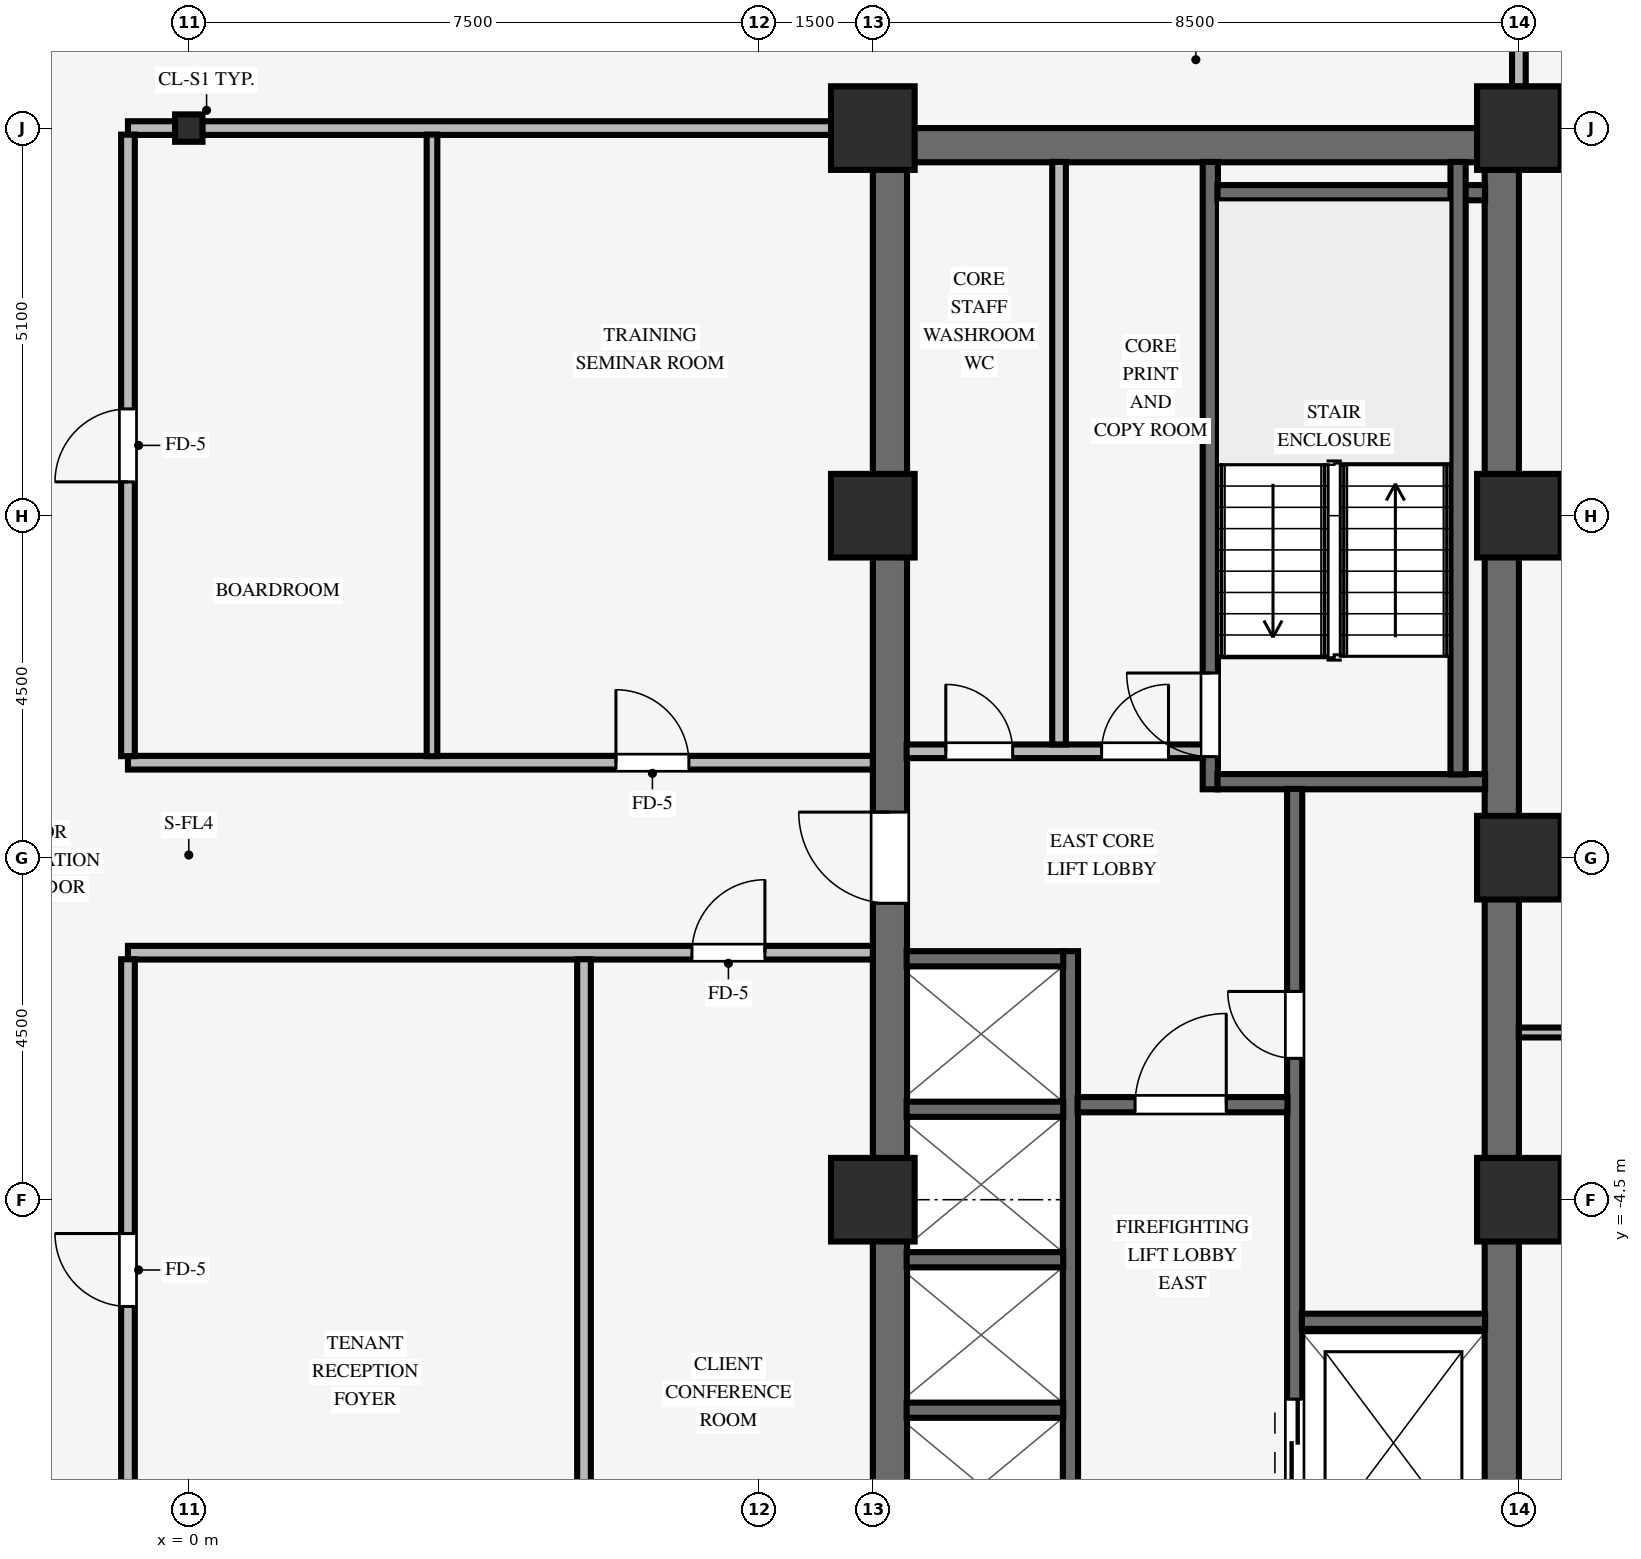
"""IFC4 building model, lengths in metres.
Left out: names, types, materials, properties, quantities, classifications, styles, units other than length and angle.
Written with IfcOpenShell. Run it as: python <this file> out.ifc"""

import sys

from ifc_helpers import new_model, si_unit, direction, frame, frame_2d, origin, origin_2d, place, context, subcontext, project, spatial, rectangle, i_section, extrude, source, transform, mapped, element, fill, save


model = new_model("IFC4")
c1 = context("Model", 3, precision=1e-05, world=origin(), true_north=direction((0.0, 1.0)))
c2 = subcontext(c1, "Body", "Model", "MODEL_VIEW")
j1 = project(units=[si_unit("LENGTHUNIT", "METRE"), si_unit("PLANEANGLEUNIT", "RADIAN")], contexts=[c1])
p1 = place(None, origin())
s1 = spatial("IfcSite", under=j1, at=p1, CompositionType="ELEMENT")
p2 = place(p1, origin())
s2 = spatial("IfcBuilding", under=s1, at=p2, CompositionType="ELEMENT")
p3 = place(p2, frame((0.0, 0.0, 82.35)))
s3 = spatial("IfcBuildingStorey", under=s2, at=p3, CompositionType="ELEMENT", Elevation=82.35)
p4 = place(p3, frame((9.0, 9.375, 0.0), z_axis=(0.0, 0.0, 1.0), x_axis=(1.0, 0.0, 0.0)))
e1 = element("IfcWall", 1, at=p4, inside=s3, PredefinedType="SHEAR", context=c2, shape_type="SweptSolid", body=[
    extrude(rectangle(XDim=8.5, YDim=0.45, at=frame_2d((4.25, 0.0))), origin(), (0.0, 0.0, 1.0), 3.25),
])
p5 = place(p3, frame((9.225, -9.155, 0.0), z_axis=(0.0, 0.0, 1.0), x_axis=(0.0, 1.0, 0.0)))
e2 = element("IfcWall", 2, at=p5, inside=s3, PredefinedType="SHEAR", context=c2, shape_type="SweptSolid", body=[
    extrude(rectangle(XDim=18.31, YDim=0.45, at=frame_2d((9.155, 0.0))), origin(), (0.0, 0.0, 1.0), 3.25),
])
p6 = place(p5, frame((8.555, 0.0, 0.0)))
e3 = element("IfcOpeningElement", 3, at=p6, cuts=e2, PredefinedType="OPENING", context=c2, shape_type="SweptSolid", body=[
    extrude(rectangle(XDim=1.2, YDim=2.15, at=frame_2d((0.6, 1.075))), frame((0.0, 0.235, 0.0), z_axis=(0.0, -1.0, 0.0), x_axis=(1.0, 0.0, 0.0)), (0.0, 0.0, 1.0), 0.47),
])
p7 = place(p3, frame((17.275, -9.155, 0.0), z_axis=(0.0, 0.0, 1.0), x_axis=(0.0, 1.0, 0.0)))
e4 = element("IfcWall", 4, at=p7, inside=s3, PredefinedType="SHEAR", context=c2, shape_type="SweptSolid", body=[
    extrude(rectangle(XDim=18.31, YDim=0.45, at=frame_2d((9.155, 0.0))), origin(), (0.0, 0.0, 1.0), 3.25),
])
for number, where, z_axis, x_axis in (
    (5, (9.0, -4.5, 0.0), (0.0, 0.0, 1.0), (1.0, 0.0, 0.0)),
    (6, (9.0, 4.5, 0.0), (0.0, 0.0, 1.0), (1.0, 0.0, 0.0)),
    (7, (9.0, 9.6, 0.0), (0.0, 0.0, 1.0), (1.0, 0.0, 0.0)),
    (8, (17.5, -4.5, 0.0), (0.0, 0.0, 1.0), (1.0, 0.0, 0.0)),
    (9, (17.5, 4.5, 0.0), (0.0, 0.0, 1.0), (1.0, 0.0, 0.0)),
    (10, (17.5, 9.6, 0.0), (0.0, 0.0, 1.0), (1.0, 0.0, 0.0)),
    (11, (17.5, 0.0, 0.0), (0.0, 0.0, 1.0), (1.0, 0.0, 0.0)),
):
    element("IfcColumn", number, at=place(p3, frame(where, z_axis=z_axis, x_axis=x_axis)), inside=s3, PredefinedType="COLUMN", context=c2, shape_type="SweptSolid", body=[
        extrude(rectangle(XDim=1.1, YDim=1.1, at=origin_2d()), origin(), (0.0, 0.0, 1.0), 3.25),
    ])
p8 = place(p3, frame((0.0, 9.6, 0.0), z_axis=(0.0, 0.0, 1.0), x_axis=(1.0, 0.0, 0.0)))
e12 = element("IfcColumn", 12, at=p8, inside=s3, PredefinedType="COLUMN", context=c2, shape_type="SweptSolid", body=[
    extrude(i_section(OverallWidth=0.36, OverallDepth=0.36, WebThickness=0.021, FlangeThickness=0.021, FilletRadius=0.018, at=origin_2d()), origin(), (0.0, 0.0, 1.0), 3.25),
])
p9 = place(p3, frame((13.44, 0.9, 0.0), z_axis=(0.0, 0.0, 1.0), x_axis=(0.0, 1.0, 0.0)))
e13 = element("IfcWall", 13, at=p9, inside=s3, PredefinedType="SHEAR", context=c2, shape_type="SweptSolid", body=[
    extrude(rectangle(XDim=8.255, YDim=0.2, at=frame_2d((4.127, 0.0))), origin(), (0.0, 0.0, 1.0), 3.25),
])
p10 = place(p9, frame((0.43, 0.0, 0.0)))
e14 = element("IfcOpeningElement", 14, at=p10, cuts=e13, PredefinedType="OPENING", context=c2, shape_type="SweptSolid", body=[
    extrude(rectangle(XDim=1.1, YDim=2.15, at=frame_2d((0.55, 1.075))), frame((0.0, 0.11, 0.0), z_axis=(0.0, -1.0, 0.0), x_axis=(1.0, 0.0, 0.0)), (0.0, 0.0, 1.0), 0.22),
])
for number, where, z_axis, x_axis in (
    (15, (13.535, 1.0, 0.0), (0.0, 0.0, 1.0), (1.0, 0.0, 0.0)),
    (16, (13.535, 8.75, 0.0), (0.0, 0.0, 1.0), (1.0, 0.0, 0.0)),
):
    element("IfcWall", number, at=place(p3, frame(where, z_axis=z_axis, x_axis=x_axis)), inside=s3, PredefinedType="SHEAR", context=c2, shape_type="SweptSolid", body=[
        extrude(rectangle(XDim=3.52, YDim=0.2, at=frame_2d((1.76, 0.0))), origin(), (0.0, 0.0, 1.0), 3.25),
    ])
p11 = place(p3, frame((16.7, 1.095, 0.0), z_axis=(0.0, 0.0, 1.0), x_axis=(0.0, 1.0, 0.0)))
e17 = element("IfcWall", 17, at=p11, inside=s3, PredefinedType="SHEAR", context=c2, shape_type="SweptSolid", body=[
    extrude(rectangle(XDim=8.06, YDim=0.2, at=frame_2d((4.03, 0.0))), origin(), (0.0, 0.0, 1.0), 3.25),
])
p12 = place(p3, frame((14.55, -9.155, 0.0), z_axis=(0.0, 0.0, 1.0), x_axis=(0.0, 1.0, 0.0)))
e18 = element("IfcWall", 18, at=p12, inside=s3, PredefinedType="SHEAR", context=c2, shape_type="SweptSolid", body=[
    extrude(rectangle(XDim=10.06, YDim=0.2, at=frame_2d((5.03, 0.0))), origin(), (0.0, 0.0, 1.0), 3.25),
])
p13 = place(p12, frame((6.515, 0.0, 0.0)))
e19 = element("IfcOpeningElement", 19, at=p13, cuts=e18, PredefinedType="OPENING", context=c2, shape_type="SweptSolid", body=[
    extrude(rectangle(XDim=0.88, YDim=2.1, at=frame_2d((0.44, 1.05))), frame((0.0, 0.11, 0.0), z_axis=(0.0, -1.0, 0.0), x_axis=(1.0, 0.0, 0.0)), (0.0, 0.0, 1.0), 0.22),
])
p14 = place(p12, frame((0.88, 0.0, 0.0)))
e20 = element("IfcOpeningElement", 20, at=p14, cuts=e18, PredefinedType="OPENING", context=c2, shape_type="SweptSolid", body=[
    extrude(rectangle(XDim=1.15, YDim=2.15, at=frame_2d((0.575, 1.075))), frame((0.0, 0.11, 0.0), z_axis=(0.0, -1.0, 0.0), x_axis=(1.0, 0.0, 0.0)), (0.0, 0.0, 1.0), 0.22),
])
p15 = place(p3, frame((14.645, -6.1, 0.0), z_axis=(0.0, 0.0, 1.0), x_axis=(1.0, 0.0, 0.0)))
e21 = element("IfcWall", 21, at=p15, inside=s3, PredefinedType="SHEAR", context=c2, shape_type="SweptSolid", body=[
    extrude(rectangle(XDim=2.41, YDim=0.2, at=frame_2d((1.205, 0.0))), origin(), (0.0, 0.0, 1.0), 3.25),
])
p16 = place(p3, frame((11.6, -9.155, 0.0), z_axis=(0.0, 0.0, 1.0), x_axis=(0.0, 1.0, 0.0)))
e22 = element("IfcWall", 22, at=p16, inside=s3, PredefinedType="SHEAR", context=c2, shape_type="SweptSolid", body=[
    extrude(rectangle(XDim=7.925, YDim=0.2, at=frame_2d((3.962, 0.0))), origin(), (0.0, 0.0, 1.0), 3.25),
])
p17 = place(p3, frame((11.695, -3.25, 0.0), z_axis=(0.0, 0.0, 1.0), x_axis=(1.0, 0.0, 0.0)))
e23 = element("IfcWall", 23, at=p17, inside=s3, PredefinedType="SHEAR", context=c2, shape_type="SweptSolid", body=[
    extrude(rectangle(XDim=2.76, YDim=0.2, at=frame_2d((1.38, 0.0))), origin(), (0.0, 0.0, 1.0), 3.25),
])
p18 = place(p17, frame((0.755, 0.0, 0.0)))
e24 = element("IfcOpeningElement", 24, at=p18, cuts=e23, PredefinedType="OPENING", context=c2, shape_type="SweptSolid", body=[
    extrude(rectangle(XDim=1.2, YDim=2.15, at=frame_2d((0.6, 1.075))), frame((0.0, 0.11, 0.0), z_axis=(0.0, -1.0, 0.0), x_axis=(1.0, 0.0, 0.0)), (0.0, 0.0, 1.0), 0.22),
])
for number, where, z_axis, x_axis in (
    (25, (9.445, -7.27, 0.0), (0.0, 0.0, 1.0), (1.0, 0.0, 0.0)),
    (26, (9.445, -5.29, 0.0), (0.0, 0.0, 1.0), (1.0, 0.0, 0.0)),
    (27, (9.445, -3.31, 0.0), (0.0, 0.0, 1.0), (1.0, 0.0, 0.0)),
    (28, (9.445, -1.33, 0.0), (0.0, 0.0, 1.0), (1.0, 0.0, 0.0)),
):
    element("IfcWall", number, at=place(p3, frame(where, z_axis=z_axis, x_axis=x_axis)), inside=s3, PredefinedType="SHEAR", context=c2, shape_type="SweptSolid", body=[
        extrude(rectangle(XDim=2.06, YDim=0.2, at=frame_2d((1.03, 0.0))), origin(), (0.0, 0.0, 1.0), 3.25),
    ])
p19 = place(p3, frame((9.445, 1.4, 0.0), z_axis=(0.0, 0.0, 1.0), x_axis=(1.0, 0.0, 0.0)))
e29 = element("IfcWall", 29, at=p19, inside=s3, PredefinedType="PARTITIONING", context=c2, shape_type="SweptSolid", body=[
    extrude(rectangle(XDim=3.9, YDim=0.18, at=frame_2d((1.95, 0.0))), origin(), (0.0, 0.0, 1.0), 3.24),
])
p20 = place(p19, frame((0.515, 0.0, 0.0)))
e30 = element("IfcOpeningElement", 30, at=p20, cuts=e29, PredefinedType="OPENING", context=c2, shape_type="SweptSolid", body=[
    extrude(rectangle(XDim=0.88, YDim=2.1, at=frame_2d((0.44, 1.05))), frame((0.0, 0.1, 0.0), z_axis=(0.0, -1.0, 0.0), x_axis=(1.0, 0.0, 0.0)), (0.0, 0.0, 1.0), 0.2),
])
p21 = place(p19, frame((2.565, 0.0, 0.0)))
e31 = element("IfcOpeningElement", 31, at=p21, cuts=e29, PredefinedType="OPENING", context=c2, shape_type="SweptSolid", body=[
    extrude(rectangle(XDim=0.88, YDim=2.1, at=frame_2d((0.44, 1.05))), frame((0.0, 0.1, 0.0), z_axis=(0.0, -1.0, 0.0), x_axis=(1.0, 0.0, 0.0)), (0.0, 0.0, 1.0), 0.2),
])
p22 = place(p3, frame((11.45, 1.49, 0.0), z_axis=(0.0, 0.0, 1.0), x_axis=(0.0, 1.0, 0.0)))
e32 = element("IfcWall", 32, at=p22, inside=s3, PredefinedType="PARTITIONING", context=c2, shape_type="SweptSolid", body=[
    extrude(rectangle(XDim=7.665, YDim=0.18, at=frame_2d((3.833, 0.0))), origin(), (0.0, 0.0, 1.0), 3.24),
])
p23 = place(p3, frame((17.5, -2.3, 0.0), z_axis=(0.0, 0.0, 1.0), x_axis=(1.0, 0.0, 0.0)))
e33 = element("IfcWall", 33, at=p23, inside=s3, PredefinedType="PARTITIONING", context=c2, shape_type="SweptSolid", body=[
    extrude(rectangle(XDim=3.66, YDim=0.13, at=frame_2d((1.83, 0.0))), origin(), (0.0, 0.0, 1.0), 3.24),
])
p24 = place(p3, frame((-0.8, -1.25, 0.0), z_axis=(0.0, 0.0, 1.0), x_axis=(1.0, 0.0, 0.0)))
e34 = element("IfcWall", 34, at=p24, inside=s3, PredefinedType="PARTITIONING", context=c2, shape_type="SweptSolid", body=[
    extrude(rectangle(XDim=9.8, YDim=0.18, at=frame_2d((4.9, 0.0))), origin(), (0.0, 0.0, 1.0), 3.24),
])
p25 = place(p24, frame((7.42, 0.0, 0.0)))
e35 = element("IfcOpeningElement", 35, at=p25, cuts=e34, PredefinedType="OPENING", context=c2, shape_type="SweptSolid", body=[
    extrude(rectangle(XDim=0.96, YDim=2.1, at=frame_2d((0.48, 1.05))), frame((0.0, 0.1, 0.0), z_axis=(0.0, -1.0, 0.0), x_axis=(1.0, 0.0, 0.0)), (0.0, 0.0, 1.0), 0.2),
])
p26 = place(p3, frame((-0.8, 1.25, 0.0), z_axis=(0.0, 0.0, 1.0), x_axis=(1.0, 0.0, 0.0)))
e36 = element("IfcWall", 36, at=p26, inside=s3, PredefinedType="PARTITIONING", context=c2, shape_type="SweptSolid", body=[
    extrude(rectangle(XDim=9.8, YDim=0.18, at=frame_2d((4.9, 0.0))), origin(), (0.0, 0.0, 1.0), 3.24),
])
p27 = place(p26, frame((6.42, 0.0, 0.0)))
e37 = element("IfcOpeningElement", 37, at=p27, cuts=e36, PredefinedType="OPENING", context=c2, shape_type="SweptSolid", body=[
    extrude(rectangle(XDim=0.96, YDim=2.1, at=frame_2d((0.48, 1.05))), frame((0.0, 0.1, 0.0), z_axis=(0.0, -1.0, 0.0), x_axis=(1.0, 0.0, 0.0)), (0.0, 0.0, 1.0), 0.2),
])
p28 = place(p3, frame((-0.8, 9.6, 0.0), z_axis=(0.0, 0.0, 1.0), x_axis=(1.0, 0.0, 0.0)))
e38 = element("IfcWall", 38, at=p28, inside=s3, PredefinedType="PARTITIONING", context=c2, shape_type="SweptSolid", body=[
    extrude(rectangle(XDim=0.624, YDim=0.18, at=frame_2d((0.312, 0.0))), origin(), (0.0, 0.0, 1.0), 2.285),
])
p29 = place(p3, frame((0.176, 9.6, 0.0), z_axis=(0.0, 0.0, 1.0), x_axis=(1.0, 0.0, 0.0)))
e39 = element("IfcWall", 39, at=p29, inside=s3, PredefinedType="PARTITIONING", context=c2, shape_type="SweptSolid", body=[
    extrude(rectangle(XDim=8.278, YDim=0.18, at=frame_2d((4.139, 0.0))), origin(), (0.0, 0.0, 1.0), 2.285),
])
p30 = place(p3, frame((-0.8, -9.514, 0.0), z_axis=(0.0, 0.0, 1.0), x_axis=(0.0, 1.0, 0.0)))
e40 = element("IfcWall", 40, at=p30, inside=s3, PredefinedType="PARTITIONING", context=c2, shape_type="SweptSolid", body=[
    extrude(rectangle(XDim=8.178, YDim=0.18, at=frame_2d((4.089, 0.0))), origin(), (0.0, 0.0, 1.0), 3.24),
])
p31 = place(p30, frame((3.609, 0.0, 0.0)))
e41 = element("IfcOpeningElement", 41, at=p31, cuts=e40, PredefinedType="OPENING", context=c2, shape_type="SweptSolid", body=[
    extrude(rectangle(XDim=0.96, YDim=2.1, at=frame_2d((0.48, 1.05))), frame((0.0, 0.1, 0.0), z_axis=(0.0, -1.0, 0.0), x_axis=(1.0, 0.0, 0.0)), (0.0, 0.0, 1.0), 0.2),
])
p32 = place(p3, frame((-0.8, 1.336, 0.0), z_axis=(0.0, 0.0, 1.0), x_axis=(0.0, 1.0, 0.0)))
e42 = element("IfcWall", 42, at=p32, inside=s3, PredefinedType="PARTITIONING", context=c2, shape_type="SweptSolid", body=[
    extrude(rectangle(XDim=8.178, YDim=0.18, at=frame_2d((4.089, 0.0))), origin(), (0.0, 0.0, 1.0), 3.24),
])
p33 = place(p32, frame((3.609, 0.0, 0.0)))
e43 = element("IfcOpeningElement", 43, at=p33, cuts=e42, PredefinedType="OPENING", context=c2, shape_type="SweptSolid", body=[
    extrude(rectangle(XDim=0.96, YDim=2.1, at=frame_2d((0.48, 1.05))), frame((0.0, 0.1, 0.0), z_axis=(0.0, -1.0, 0.0), x_axis=(1.0, 0.0, 0.0)), (0.0, 0.0, 1.0), 0.2),
])
p34 = place(p3, frame((3.2, 1.336, 0.0), z_axis=(0.0, 0.0, 1.0), x_axis=(0.0, 1.0, 0.0)))
e44 = element("IfcWall", 44, at=p34, inside=s3, PredefinedType="PARTITIONING", context=c2, shape_type="SweptSolid", body=[
    extrude(rectangle(XDim=8.178, YDim=0.14, at=frame_2d((4.089, 0.0))), origin(), (0.0, 0.0, 1.0), 3.24),
])
p35 = place(p3, frame((5.2, -9.514, 0.0), z_axis=(0.0, 0.0, 1.0), x_axis=(0.0, 1.0, 0.0)))
e45 = element("IfcWall", 45, at=p35, inside=s3, PredefinedType="PARTITIONING", context=c2, shape_type="SweptSolid", body=[
    extrude(rectangle(XDim=8.178, YDim=0.18, at=frame_2d((4.089, 0.0))), origin(), (0.0, 0.0, 1.0), 3.24),
])
p36 = place(p3, frame((17.5, 10.146, 0.0), z_axis=(0.0, 0.0, 1.0), x_axis=(0.0, 1.0, 0.0)))
e46 = element("IfcWall", 46, at=p36, inside=s3, PredefinedType="PARTITIONING", context=c2, shape_type="SweptSolid", body=[
    extrude(rectangle(XDim=0.968, YDim=0.18, at=frame_2d((0.484, 0.0))), origin(), (0.0, 0.0, 1.0), 2.618),
])
m1 = source(origin(), c2, "Body", "SweptSolid", [
    extrude(rectangle(XDim=1.1, YDim=2.15, at=frame_2d((0.55, 1.075))), frame((0.0, 0.025, 0.0), z_axis=(0.0, -1.0, 0.0), x_axis=(1.0, 0.0, 0.0)), (0.0, 0.0, 1.0), 0.05),
])
p37 = place(p10, origin())
e47 = element("IfcDoor", 47, at=p37, inside=s3, OperationType="SINGLE_SWING_RIGHT", PredefinedType="DOOR", context=c2, shape_type="MappedRepresentation", body=[
    mapped(m1, transform((0.0, 0.0, 0.0), scale=1.0)),
])
fill(e14, e47)
m2 = source(origin(), c2, "Body", "SweptSolid", [
    extrude(rectangle(XDim=0.88, YDim=2.1, at=frame_2d((0.44, 1.05))), frame((0.0, 0.025, 0.0), z_axis=(0.0, -1.0, 0.0), x_axis=(1.0, 0.0, 0.0)), (0.0, 0.0, 1.0), 0.05),
])
p38 = place(p13, origin())
e48 = element("IfcDoor", 48, at=p38, inside=s3, OperationType="SINGLE_SWING_RIGHT", PredefinedType="DOOR", context=c2, shape_type="MappedRepresentation", body=[
    mapped(m2, transform((0.0, 0.0, 0.0), scale=1.0)),
])
fill(e19, e48)
m3 = source(origin(), c2, "Body", "SweptSolid", [
    extrude(rectangle(XDim=1.2, YDim=2.15, at=frame_2d((0.6, 1.075))), frame((0.0, 0.025, 0.0), z_axis=(0.0, -1.0, 0.0), x_axis=(1.0, 0.0, 0.0)), (0.0, 0.0, 1.0), 0.05),
])
p39 = place(p18, origin())
e49 = element("IfcDoor", 49, at=p39, inside=s3, OperationType="SINGLE_SWING_RIGHT", PredefinedType="DOOR", context=c2, shape_type="MappedRepresentation", body=[
    mapped(m3, transform((0.0, 0.0, 0.0), scale=1.0)),
])
fill(e24, e49)
p40 = place(p6, origin())
e50 = element("IfcDoor", 50, at=p40, inside=s3, OperationType="SINGLE_SWING_RIGHT", PredefinedType="DOOR", context=c2, shape_type="MappedRepresentation", body=[
    mapped(m3, transform((0.0, 0.0, 0.0), scale=1.0)),
])
fill(e3, e50)
p41 = place(p20, origin())
e51 = element("IfcDoor", 51, at=p41, inside=s3, OperationType="SINGLE_SWING_LEFT", PredefinedType="DOOR", context=c2, shape_type="MappedRepresentation", body=[
    mapped(m2, transform((0.0, 0.0, 0.0), scale=1.0)),
])
fill(e30, e51)
p42 = place(p21, origin())
e52 = element("IfcDoor", 52, at=p42, inside=s3, OperationType="SINGLE_SWING_RIGHT", PredefinedType="DOOR", context=c2, shape_type="MappedRepresentation", body=[
    mapped(m2, transform((0.0, 0.0, 0.0), scale=1.0)),
])
fill(e31, e52)
m4 = source(origin(), c2, "Body", "SweptSolid", [
    extrude(rectangle(XDim=1.15, YDim=2.15, at=frame_2d((0.575, 1.075))), frame((0.0, 0.025, 0.0), z_axis=(0.0, -1.0, 0.0), x_axis=(1.0, 0.0, 0.0)), (0.0, 0.0, 1.0), 0.05),
])
p43 = place(p14, origin())
e53 = element("IfcDoor", 53, at=p43, inside=s3, OperationType="DOUBLE_DOOR_SLIDING", PredefinedType="DOOR", context=c2, shape_type="MappedRepresentation", body=[
    mapped(m4, transform((0.0, 0.0, 0.0), scale=1.0)),
])
fill(e20, e53)
m5 = source(origin(), c2, "Body", "SweptSolid", [
    extrude(rectangle(XDim=0.96, YDim=2.1, at=frame_2d((0.48, 1.05))), frame((0.0, 0.025, 0.0), z_axis=(0.0, -1.0, 0.0), x_axis=(1.0, 0.0, 0.0)), (0.0, 0.0, 1.0), 0.05),
])
p44 = place(p33, origin())
e54 = element("IfcDoor", 54, at=p44, inside=s3, OperationType="SINGLE_SWING_LEFT", PredefinedType="DOOR", context=c2, shape_type="MappedRepresentation", body=[
    mapped(m5, transform((0.0, 0.0, 0.0), scale=1.0)),
])
fill(e43, e54)
p45 = place(p31, origin())
e55 = element("IfcDoor", 55, at=p45, inside=s3, OperationType="SINGLE_SWING_RIGHT", PredefinedType="DOOR", context=c2, shape_type="MappedRepresentation", body=[
    mapped(m5, transform((0.0, 0.0, 0.0), scale=1.0)),
])
fill(e41, e55)
p46 = place(p27, origin())
e56 = element("IfcDoor", 56, at=p46, inside=s3, OperationType="SINGLE_SWING_LEFT", PredefinedType="DOOR", context=c2, shape_type="MappedRepresentation", body=[
    mapped(m5, transform((0.0, 0.0, 0.0), scale=1.0)),
])
fill(e37, e56)
p47 = place(p25, origin())
e57 = element("IfcDoor", 57, at=p47, inside=s3, OperationType="SINGLE_SWING_RIGHT", PredefinedType="DOOR", context=c2, shape_type="MappedRepresentation", body=[
    mapped(m5, transform((0.0, 0.0, 0.0), scale=1.0)),
])
fill(e35, e57)
save(model, sys.argv[1])
